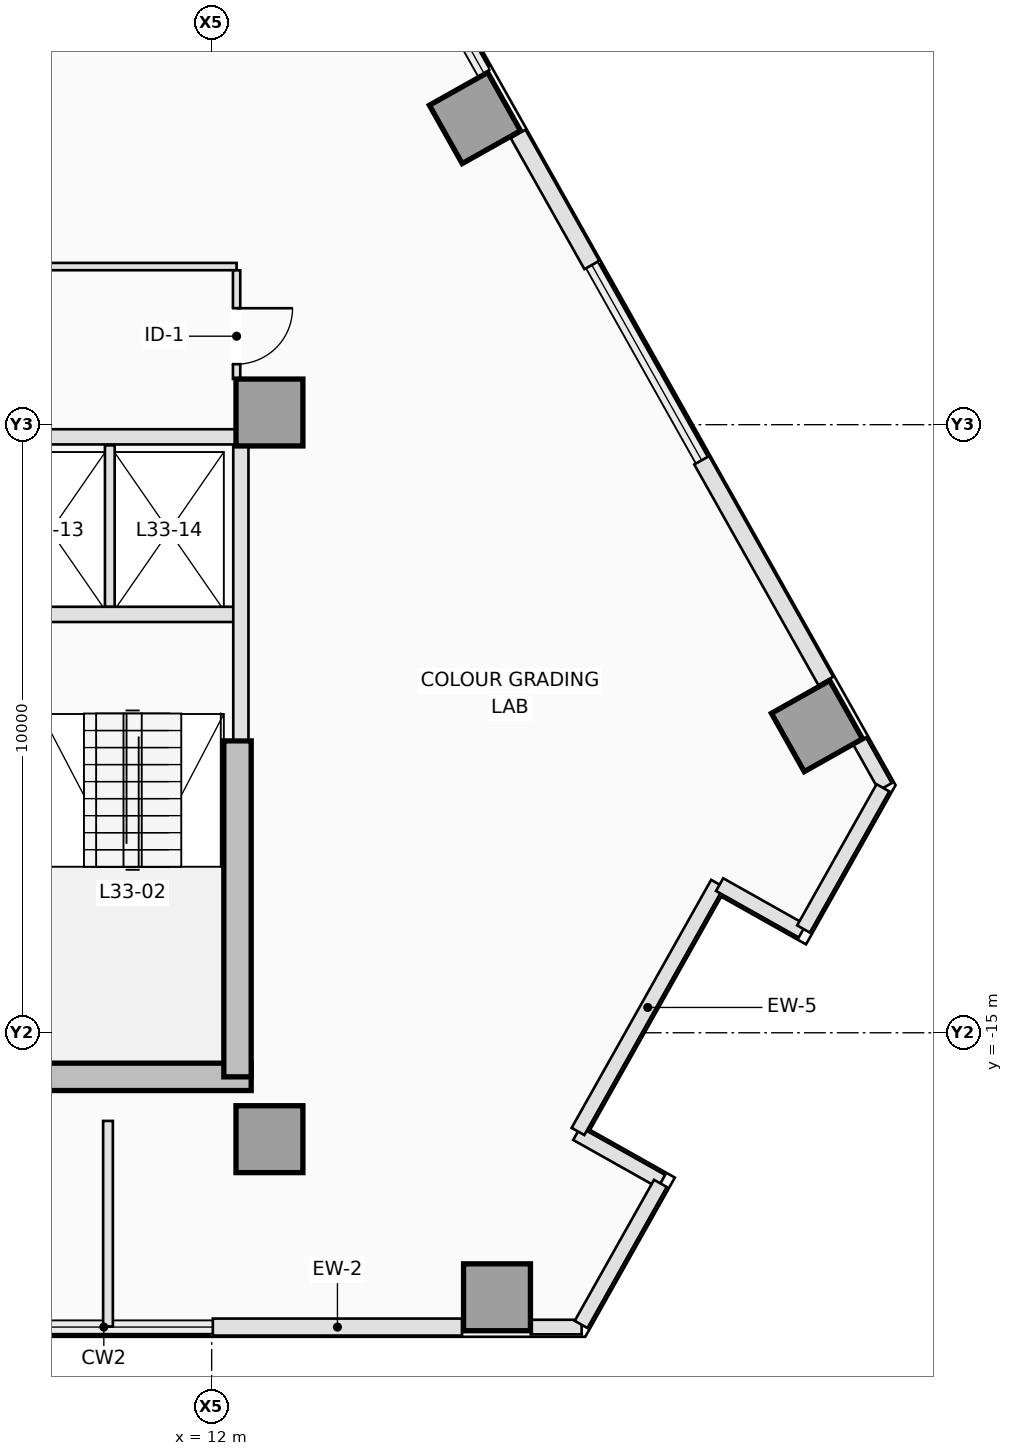
"""IFC4 building model, lengths in metres.
Left out: names, types, materials, properties, quantities, classifications, styles, units other than length and angle.
Written with IfcOpenShell. Run it as: python <this file> out.ifc"""

import sys

from ifc_helpers import new_model, si_unit, direction, frame, frame_2d, origin, origin_2d, place, context, subcontext, project, spatial, rectangle, extrude, element, fill, save


model = new_model("IFC4")
c1 = context("Model", 3, precision=1e-05, world=origin(), true_north=direction((0.0, 1.0)))
c2 = subcontext(c1, "Body", "Model", "MODEL_VIEW")
j1 = project(units=[si_unit("LENGTHUNIT", "METRE"), si_unit("PLANEANGLEUNIT", "RADIAN")], contexts=[c1])
p1 = place(None, origin())
s1 = spatial("IfcSite", under=j1, at=p1, CompositionType="ELEMENT")
p2 = place(p1, origin())
s2 = spatial("IfcBuilding", under=s1, at=p2, CompositionType="ELEMENT")
p3 = place(p2, frame((0.0, 0.0, 123.0)))
s3 = spatial("IfcBuildingStorey", under=s2, at=p3, CompositionType="ELEMENT", Elevation=123.0)
p4 = place(p3, frame((8.75, -15.725, 0.0), z_axis=(0.0, 0.0, 1.0), x_axis=(1.0, 0.0, 0.0)))
e1 = element("IfcWall", 1, at=p4, inside=s3, PredefinedType="SHEAR", context=c2, shape_type="SweptSolid", body=[
    extrude(rectangle(XDim=3.9, YDim=0.45, at=frame_2d((1.95, 0.0))), origin(), (0.0, 0.0, 1.0), 3.5),
])
p5 = place(p3, frame((12.425, -15.725, 0.0), z_axis=(0.0, 0.0, 1.0), x_axis=(0.0, 1.0, 0.0)))
e2 = element("IfcWall", 2, at=p5, inside=s3, PredefinedType="SHEAR", context=c2, shape_type="SweptSolid", body=[
    extrude(rectangle(XDim=5.525, YDim=0.45, at=frame_2d((2.763, 0.0))), origin(), (0.0, 0.0, 1.0), 3.5),
])
for number, where, z_axis, x_axis in (
    (3, (12.95, -16.75, 0.0), (0.0, 0.0, 1.0), (1.0, 0.0, 0.0)),
    (4, (12.95, -4.8, 0.0), (0.0, 0.0, 1.0), (1.0, 0.0, 0.0)),
    (5, (16.692, -19.35, 0.0), (0.0, 0.0, 1.0), (0.0, 1.0, 0.0)),
    (6, (21.955, -9.957, 0.0), (0.0, 0.0, 1.0), (0.872, 0.49, 0.0)),
    (7, (16.33, 0.043, 0.0), (0.0, 0.0, 1.0), (0.872, 0.49, 0.0)),
):
    element("IfcColumn", number, at=place(p3, frame(where, z_axis=z_axis, x_axis=x_axis)), inside=s3, PredefinedType="COLUMN", context=c2, shape_type="SweptSolid", body=[
        extrude(rectangle(XDim=1.1, YDim=1.1, at=origin_2d()), origin(), (0.0, 0.0, 1.0), 3.5),
    ])
p6 = place(p3, frame((18.084, -19.84, 0.0), z_axis=(0.0, 0.0, 1.0), x_axis=(-1.0, 0.0, 0.0)))
e8 = element("IfcWall", 8, at=p6, inside=s3, PredefinedType="STANDARD", context=c2, shape_type="SweptSolid", body=[
    extrude(rectangle(XDim=0.836, YDim=0.24, at=frame_2d((0.418, 0.0))), origin(), (0.0, 0.0, 1.0), 3.25),
])
p7 = place(p3, frame((16.117, -19.84, 0.0), z_axis=(0.0, 0.0, 1.0), x_axis=(-1.0, 0.0, 0.0)))
e9 = element("IfcWall", 9, at=p7, inside=s3, PredefinedType="STANDARD", context=c2, shape_type="SweptSolid", body=[
    extrude(rectangle(XDim=4.098, YDim=0.28, at=frame_2d((2.049, 0.0))), origin(), (0.0, 0.0, 1.0), 3.25),
])
p8 = place(p3, frame((22.654, -10.2, 0.0), z_axis=(0.0, 0.0, 1.0), x_axis=(0.490355003566, -0.871522788272, 0.0)))
e10 = element("IfcWall", 10, at=p8, inside=s3, PredefinedType="STANDARD", context=c2, shape_type="SweptSolid", body=[
    extrude(rectangle(XDim=0.865, YDim=0.24, at=frame_2d((0.433, 0.0))), origin(), (0.0, 0.0, 1.0), 3.25),
])
p9 = place(p3, frame((17.039, -0.218, 0.0), z_axis=(0.0, 0.0, 1.0), x_axis=(0.490186269625, -0.871617703509, 0.0)))
e11 = element("IfcWall", 11, at=p9, inside=s3, PredefinedType="STANDARD", context=c2, shape_type="SweptSolid", body=[
    extrude(rectangle(XDim=2.474, YDim=0.28, at=frame_2d((1.237, 0.0))), origin(), (0.0, 0.0, 1.0), 3.25),
])
p10 = place(p3, frame((20.058, -5.586, 0.0), z_axis=(0.0, 0.0, 1.0), x_axis=(0.490255672477, -0.871578668626, 0.0)))
e12 = element("IfcWall", 12, at=p10, inside=s3, PredefinedType="STANDARD", context=c2, shape_type="SweptSolid", body=[
    extrude(rectangle(XDim=4.164, YDim=0.28, at=frame_2d((2.082, 0.0))), origin(), (0.0, 0.0, 1.0), 3.25),
])
p11 = place(p3, frame((19.399, -17.442, 0.0), z_axis=(0.0, 0.0, 1.0), x_axis=(-0.871575537125, 0.490261239633, 0.0)))
e13 = element("IfcWall", 13, at=p11, inside=s3, PredefinedType="STANDARD", context=c2, shape_type="SweptSolid", body=[
    extrude(rectangle(XDim=1.6, YDim=0.24, at=frame_2d((0.8, 0.0))), origin(), (0.0, 0.0, 1.0), 3.25),
])
p12 = place(p3, frame((18.024, -16.623, 0.0), z_axis=(0.0, 0.0, 1.0), x_axis=(0.490273623647, 0.871568571001, 0.0)))
e14 = element("IfcWall", 14, at=p12, inside=s3, PredefinedType="STANDARD", context=c2, shape_type="SweptSolid", body=[
    extrude(rectangle(XDim=4.68, YDim=0.24, at=frame_2d((2.34, 0.0))), origin(), (0.0, 0.0, 1.0), 2.722),
])
p13 = place(p3, frame((20.354, -12.564, 0.0), z_axis=(0.0, 0.0, 1.0), x_axis=(0.871546278971, -0.490313250496, 0.0)))
e15 = element("IfcWall", 15, at=p13, inside=s3, PredefinedType="STANDARD", context=c2, shape_type="SweptSolid", body=[
    extrude(rectangle(XDim=1.56, YDim=0.24, at=frame_2d((0.78, 0.0))), origin(), (0.0, 0.0, 1.0), 3.25),
])
p14 = place(p3, frame((21.733, -13.294, 0.0), z_axis=(0.0, 0.0, 1.0), x_axis=(0.490265590412, 0.871573089797, 0.0)))
e16 = element("IfcWall", 16, at=p14, inside=s3, PredefinedType="STANDARD", context=c2, shape_type="SweptSolid", body=[
    extrude(rectangle(XDim=2.664, YDim=0.24, at=frame_2d((1.332, 0.0))), origin(), (0.0, 0.0, 1.0), 3.25),
])
p15 = place(p3, frame((18.075, -19.796, 0.0), z_axis=(0.0, 0.0, 1.0), x_axis=(0.490248170584, 0.871582888335, 0.0)))
e17 = element("IfcWall", 17, at=p15, inside=s3, PredefinedType="STANDARD", context=c2, shape_type="SweptSolid", body=[
    extrude(rectangle(XDim=2.661, YDim=0.24, at=frame_2d((1.331, 0.0))), origin(), (0.0, 0.0, 1.0), 3.25),
])
p16 = place(p3, frame((9.16, -8.12, 0.0), z_axis=(0.0, 0.0, 1.0), x_axis=(1.0, 0.0, 0.0)))
e18 = element("IfcWall", 18, at=p16, inside=s3, PredefinedType="PARTITIONING", context=c2, shape_type="SweptSolid", body=[
    extrude(rectangle(XDim=3.22, YDim=0.25, at=frame_2d((1.61, 0.0))), origin(), (0.0, 0.0, 1.0), 3.25),
])
p17 = place(p3, frame((12.48, -10.18, 0.0), z_axis=(0.0, 0.0, 1.0), x_axis=(0.0, 1.0, 0.0)))
e19 = element("IfcWall", 19, at=p17, inside=s3, PredefinedType="PARTITIONING", context=c2, shape_type="SweptSolid", body=[
    extrude(rectangle(XDim=4.828, YDim=0.25, at=frame_2d((2.414, 0.0))), origin(), (0.0, 0.0, 1.0), 3.25),
])
p18 = place(p3, frame((4.302, -5.2, 0.0), z_axis=(0.0, 0.0, 1.0), x_axis=(1.0, 0.0, 0.0)))
e20 = element("IfcWall", 20, at=p18, inside=s3, PredefinedType="PARTITIONING", context=c2, shape_type="SweptSolid", body=[
    extrude(rectangle(XDim=8.096, YDim=0.25, at=frame_2d((4.048, 0.0))), origin(), (0.0, 0.0, 1.0), 3.25),
])
p19 = place(p3, frame((10.325, -7.993, 0.0), z_axis=(0.0, 0.0, 1.0), x_axis=(0.0, 1.0, 0.0)))
e21 = element("IfcWall", 21, at=p19, inside=s3, PredefinedType="PARTITIONING", context=c2, shape_type="SweptSolid", body=[
    extrude(rectangle(XDim=2.653, YDim=0.16, at=frame_2d((1.326, 0.0))), origin(), (0.0, 0.0, 1.0), 3.25),
])
p20 = place(p3, frame((8.382, -2.4, 0.0), z_axis=(0.0, 0.0, 1.0), x_axis=(1.0, 0.0, 0.0)))
e22 = element("IfcWall", 22, at=p20, inside=s3, PredefinedType="PARTITIONING", context=c2, shape_type="SweptSolid", body=[
    extrude(rectangle(XDim=4.028, YDim=0.12, at=frame_2d((2.014, 0.0))), origin(), (0.0, 0.0, 1.0), 3.25),
])
p21 = place(p3, frame((12.41, -2.462, 0.0), z_axis=(0.0, 0.0, 1.0), x_axis=(0.0, -1.0, 0.0)))
e23 = element("IfcWall", 23, at=p21, inside=s3, PredefinedType="PARTITIONING", context=c2, shape_type="SweptSolid", body=[
    extrude(rectangle(XDim=1.786, YDim=0.12, at=frame_2d((0.893, 0.0))), origin(), (0.0, 0.0, 1.0), 3.25),
])
p22 = place(p21, frame((0.623, 0.0, 0.0)))
e24 = element("IfcOpeningElement", 24, at=p22, cuts=e23, PredefinedType="OPENING", context=c2, shape_type="SweptSolid", body=[
    extrude(rectangle(XDim=0.92, YDim=2.12, at=frame_2d((0.46, 1.06))), frame((0.0, 0.07, 0.0), z_axis=(0.0, -1.0, 0.0), x_axis=(1.0, 0.0, 0.0)), (0.0, 0.0, 1.0), 0.14),
])
p23 = place(p3, frame((10.295, -19.83, 0.0), z_axis=(0.0, 0.0, 1.0), x_axis=(0.0, 1.0, 0.0)))
e25 = element("IfcWall", 25, at=p23, inside=s3, PredefinedType="PARTITIONING", context=c2, shape_type="SweptSolid", body=[
    extrude(rectangle(XDim=3.38, YDim=0.16, at=frame_2d((1.69, 0.0))), origin(), (0.0, 0.0, 1.0), 3.25),
])
p24 = place(p22, origin())
e26 = element("IfcDoor", 26, at=p24, inside=s3, OperationType="SINGLE_SWING_LEFT", PredefinedType="DOOR", context=c2, shape_type="SweptSolid", body=[
    extrude(rectangle(XDim=0.92, YDim=2.12, at=frame_2d((0.46, 1.06))), frame((0.0, 0.025, 0.0), z_axis=(0.0, -1.0, 0.0), x_axis=(1.0, 0.0, 0.0)), (0.0, 0.0, 1.0), 0.05),
])
fill(e24, e26)
save(model, sys.argv[1])
